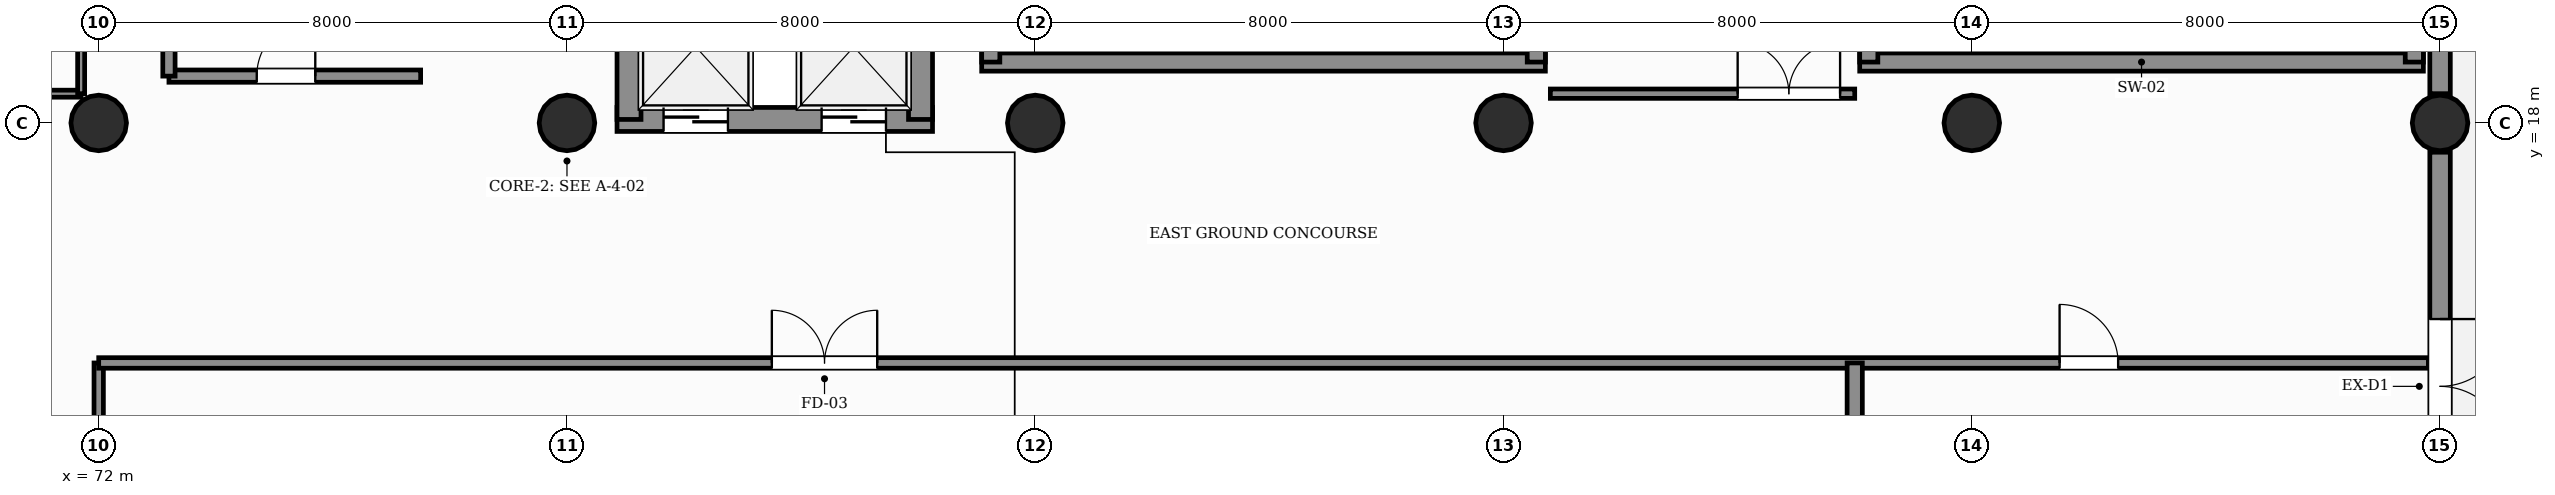
"""IFC4 building model, lengths in metres.
Left out: names, types, materials, properties, quantities, classifications, styles, units other than length and angle.
Written with IfcOpenShell. Run it as: python <this file> out.ifc"""

import sys

from ifc_helpers import new_model, si_unit, direction, frame, frame_2d, origin, origin_2d, place, context, subcontext, project, spatial, rectangle, circle, extrude, element, fill, save


model = new_model("IFC4")
c1 = context("Model", 3, precision=1e-05, world=origin(), true_north=direction((0.0, 1.0)))
c2 = subcontext(c1, "Body", "Model", "MODEL_VIEW")
j1 = project(units=[si_unit("LENGTHUNIT", "METRE"), si_unit("PLANEANGLEUNIT", "RADIAN")], contexts=[c1])
p1 = place(None, origin())
s1 = spatial("IfcSite", under=j1, at=p1, CompositionType="ELEMENT")
p2 = place(p1, origin())
s2 = spatial("IfcBuilding", under=s1, at=p2, CompositionType="ELEMENT")
p3 = place(p2, origin())
s3 = spatial("IfcBuildingStorey", under=s2, at=p3, CompositionType="ELEMENT", Elevation=0.0)
for number, where, z_axis, x_axis in (
    (1, (72.0, 18.0, 0.0), (0.0, 0.0, 1.0), (1.0, 0.0, 0.0)),
    (2, (80.0, 18.0, 0.0), (0.0, 0.0, 1.0), (1.0, 0.0, 0.0)),
    (3, (88.0, 18.0, 0.0), (0.0, 0.0, 1.0), (1.0, 0.0, 0.0)),
    (4, (96.0, 18.0, 0.0), (0.0, 0.0, 1.0), (1.0, 0.0, 0.0)),
    (5, (104.0, 18.0, 0.0), (0.0, 0.0, 1.0), (1.0, 0.0, 0.0)),
    (6, (112.0, 18.0, 0.0), (0.0, 0.0, 1.0), (1.0, 0.0, 0.0)),
):
    element("IfcColumn", number, at=place(p3, frame(where, z_axis=z_axis, x_axis=x_axis)), inside=s3, PredefinedType="COLUMN", context=c2, shape_type="SweptSolid", body=[
        extrude(circle(Radius=0.475, at=origin_2d()), origin(), (0.0, 0.0, 1.0), 6.0),
    ])
p4 = place(p3, frame((112.0, 9.5, 0.0), z_axis=(0.0, 0.0, 1.0), x_axis=(0.0, 1.0, 0.0)))
e7 = element("IfcWall", 7, at=p4, inside=s3, PredefinedType="SOLIDWALL", context=c2, shape_type="SweptSolid", body=[
    extrude(rectangle(XDim=8.0, YDim=0.35, at=frame_2d((4.0, 0.0))), origin(), (0.0, 0.0, 1.0), 4.7),
])
p5 = place(p4, frame((2.85, 0.0, 0.0)))
e8 = element("IfcOpeningElement", 8, at=p5, cuts=e7, PredefinedType="OPENING", context=c2, shape_type="SweptSolid", body=[
    extrude(rectangle(XDim=2.3, YDim=2.4, at=frame_2d((1.15, 1.2))), frame((0.0, 0.185, 0.0), z_axis=(0.0, -1.0, 0.0), x_axis=(1.0, 0.0, 0.0)), (0.0, 0.0, 1.0), 0.37),
])
p6 = place(p3, frame((112.0, 18.5, 0.0), z_axis=(0.0, 0.0, 1.0), x_axis=(0.0, 1.0, 0.0)))
e9 = element("IfcWall", 9, at=p6, inside=s3, PredefinedType="SOLIDWALL", context=c2, shape_type="SweptSolid", body=[
    extrude(rectangle(XDim=8.0, YDim=0.35, at=frame_2d((4.0, 0.0))), origin(), (0.0, 0.0, 1.0), 4.7),
])
p7 = place(p3, frame((73.2, 18.8, 0.0), z_axis=(0.0, 0.0, 1.0), x_axis=(1.0, 0.0, 0.0)))
e10 = element("IfcWall", 10, at=p7, inside=s3, PredefinedType="PARTITIONING", context=c2, shape_type="SweptSolid", body=[
    extrude(rectangle(XDim=4.3, YDim=0.21, at=frame_2d((2.15, 0.0))), origin(), (0.0, 0.0, 1.0), 4.65),
])
p8 = place(p7, frame((1.5, 0.0, 0.0)))
e11 = element("IfcOpeningElement", 11, at=p8, cuts=e10, PredefinedType="OPENING", context=c2, shape_type="SweptSolid", body=[
    extrude(rectangle(XDim=1.0, YDim=2.15, at=frame_2d((0.5, 1.075))), frame((0.0, 0.115, 0.0), z_axis=(0.0, -1.0, 0.0), x_axis=(1.0, 0.0, 0.0)), (0.0, 0.0, 1.0), 0.23),
])
p9 = place(p3, frame((73.2, 18.8, 0.0), z_axis=(0.0, 0.0, 1.0), x_axis=(0.0, 1.0, 0.0)))
e12 = element("IfcWall", 12, at=p9, inside=s3, PredefinedType="PARTITIONING", context=c2, shape_type="SweptSolid", body=[
    extrude(rectangle(XDim=4.6, YDim=0.21, at=frame_2d((2.3, 0.0))), origin(), (0.0, 0.0, 1.0), 4.65),
])
p10 = place(p3, frame((80.855, 18.06, 0.0), z_axis=(0.0, 0.0, 1.0), x_axis=(1.0, 0.0, 0.0)))
e13 = element("IfcWall", 13, at=p10, inside=s3, PredefinedType="SHEAR", context=c2, shape_type="SweptSolid", body=[
    extrude(rectangle(XDim=5.39, YDim=0.41, at=frame_2d((2.695, 0.0))), origin(), (0.0, 0.0, 1.0), 6.0),
])
p11 = place(p10, frame((0.795, 0.0, 0.0)))
e14 = element("IfcOpeningElement", 14, at=p11, cuts=e13, PredefinedType="OPENING", context=c2, shape_type="SweptSolid", body=[
    extrude(rectangle(XDim=1.1, YDim=2.2, at=frame_2d((0.55, 1.1))), frame((0.0, 0.215, 0.0), z_axis=(0.0, -1.0, 0.0), x_axis=(1.0, 0.0, 0.0)), (0.0, 0.0, 1.0), 0.43),
])
p12 = place(p10, frame((3.495, 0.0, 0.0)))
e15 = element("IfcOpeningElement", 15, at=p12, cuts=e13, PredefinedType="OPENING", context=c2, shape_type="SweptSolid", body=[
    extrude(rectangle(XDim=1.1, YDim=2.2, at=frame_2d((0.55, 1.1))), frame((0.0, 0.215, 0.0), z_axis=(0.0, -1.0, 0.0), x_axis=(1.0, 0.0, 0.0)), (0.0, 0.0, 1.0), 0.43),
])
for number, where, z_axis, x_axis in (
    (16, (81.06, 18.06, 0.0), (0.0, 0.0, 1.0), (0.0, 1.0, 0.0)),
    (17, (86.04, 18.06, 0.0), (0.0, 0.0, 1.0), (0.0, 1.0, 0.0)),
):
    element("IfcWall", number, at=place(p3, frame(where, z_axis=z_axis, x_axis=x_axis)), inside=s3, PredefinedType="SHEAR", context=c2, shape_type="SweptSolid", body=[
        extrude(rectangle(XDim=2.48, YDim=0.41, at=frame_2d((1.24, 0.0))), origin(), (0.0, 0.0, 1.0), 6.0),
    ])
p13 = place(p3, frame((102.085, 19.04, 0.0), z_axis=(0.0, 0.0, 1.0), x_axis=(1.0, 0.0, 0.0)))
e18 = element("IfcWall", 18, at=p13, inside=s3, PredefinedType="SHEAR", context=c2, shape_type="SweptSolid", body=[
    extrude(rectangle(XDim=9.63, YDim=0.31, at=frame_2d((4.815, 0.0))), origin(), (0.0, 0.0, 1.0), 6.0),
])
p14 = place(p3, frame((102.24, 19.04, 0.0), z_axis=(0.0, 0.0, 1.0), x_axis=(0.0, 1.0, 0.0)))
e19 = element("IfcWall", 19, at=p14, inside=s3, PredefinedType="SHEAR", context=c2, shape_type="SweptSolid", body=[
    extrude(rectangle(XDim=4.28, YDim=0.31, at=frame_2d((2.14, 0.0))), origin(), (0.0, 0.0, 1.0), 6.0),
])
p15 = place(p14, frame((0.55, 0.0, 0.0)))
e20 = element("IfcOpeningElement", 20, at=p15, cuts=e19, PredefinedType="OPENING", context=c2, shape_type="SweptSolid", body=[
    extrude(rectangle(XDim=1.15, YDim=2.2, at=frame_2d((0.575, 1.1))), frame((0.0, 0.165, 0.0), z_axis=(0.0, -1.0, 0.0), x_axis=(1.0, 0.0, 0.0)), (0.0, 0.0, 1.0), 0.33),
])
p16 = place(p3, frame((111.56, 19.04, 0.0), z_axis=(0.0, 0.0, 1.0), x_axis=(0.0, 1.0, 0.0)))
e21 = element("IfcWall", 21, at=p16, inside=s3, PredefinedType="SHEAR", context=c2, shape_type="SweptSolid", body=[
    extrude(rectangle(XDim=4.28, YDim=0.31, at=frame_2d((2.14, 0.0))), origin(), (0.0, 0.0, 1.0), 6.0),
])
p17 = place(p3, frame((87.085, 19.04, 0.0), z_axis=(0.0, 0.0, 1.0), x_axis=(1.0, 0.0, 0.0)))
e22 = element("IfcWall", 22, at=p17, inside=s3, PredefinedType="SHEAR", context=c2, shape_type="SweptSolid", body=[
    extrude(rectangle(XDim=9.63, YDim=0.31, at=frame_2d((4.815, 0.0))), origin(), (0.0, 0.0, 1.0), 6.0),
])
p18 = place(p3, frame((87.24, 19.04, 0.0), z_axis=(0.0, 0.0, 1.0), x_axis=(0.0, 1.0, 0.0)))
e23 = element("IfcWall", 23, at=p18, inside=s3, PredefinedType="SHEAR", context=c2, shape_type="SweptSolid", body=[
    extrude(rectangle(XDim=4.02, YDim=0.31, at=frame_2d((2.01, 0.0))), origin(), (0.0, 0.0, 1.0), 6.0),
])
p19 = place(p18, frame((0.55, 0.0, 0.0)))
e24 = element("IfcOpeningElement", 24, at=p19, cuts=e23, PredefinedType="OPENING", context=c2, shape_type="SweptSolid", body=[
    extrude(rectangle(XDim=1.25, YDim=2.2, at=frame_2d((0.625, 1.1))), frame((0.0, 0.165, 0.0), z_axis=(0.0, -1.0, 0.0), x_axis=(1.0, 0.0, 0.0)), (0.0, 0.0, 1.0), 0.33),
])
p20 = place(p3, frame((96.56, 19.04, 0.0), z_axis=(0.0, 0.0, 1.0), x_axis=(0.0, 1.0, 0.0)))
e25 = element("IfcWall", 25, at=p20, inside=s3, PredefinedType="SHEAR", context=c2, shape_type="SweptSolid", body=[
    extrude(rectangle(XDim=4.02, YDim=0.31, at=frame_2d((2.01, 0.0))), origin(), (0.0, 0.0, 1.0), 6.0),
])
p21 = place(p3, frame((58.3, 18.5, 0.0), z_axis=(0.0, 0.0, 1.0), x_axis=(1.0, 0.0, 0.0)))
e26 = element("IfcWall", 26, at=p21, inside=s3, PredefinedType="PARTITIONING", context=c2, shape_type="SweptSolid", body=[
    extrude(rectangle(XDim=13.4, YDim=0.12, at=frame_2d((6.7, 0.0))), origin(), (0.0, 0.0, 1.0), 4.65),
])
p22 = place(p21, frame((1.8, 0.0, 0.0)))
e27 = element("IfcOpeningElement", 27, at=p22, cuts=e26, PredefinedType="OPENING", context=c2, shape_type="SweptSolid", body=[
    extrude(rectangle(XDim=0.88, YDim=2.1, at=frame_2d((0.44, 1.05))), frame((0.0, 0.07, 0.0), z_axis=(0.0, -1.0, 0.0), x_axis=(1.0, 0.0, 0.0)), (0.0, 0.0, 1.0), 0.14),
])
p23 = place(p21, frame((7.0, 0.0, 0.0)))
e28 = element("IfcOpeningElement", 28, at=p23, cuts=e26, PredefinedType="OPENING", context=c2, shape_type="SweptSolid", body=[
    extrude(rectangle(XDim=0.88, YDim=2.1, at=frame_2d((0.44, 1.05))), frame((0.0, 0.07, 0.0), z_axis=(0.0, -1.0, 0.0), x_axis=(1.0, 0.0, 0.0)), (0.0, 0.0, 1.0), 0.14),
])
p24 = place(p21, frame((10.9, 0.0, 0.0)))
e29 = element("IfcOpeningElement", 29, at=p24, cuts=e26, PredefinedType="OPENING", context=c2, shape_type="SweptSolid", body=[
    extrude(rectangle(XDim=0.98, YDim=2.15, at=frame_2d((0.49, 1.075))), frame((0.0, 0.07, 0.0), z_axis=(0.0, -1.0, 0.0), x_axis=(1.0, 0.0, 0.0)), (0.0, 0.0, 1.0), 0.14),
])
p25 = place(p3, frame((71.7, 18.5, 0.0), z_axis=(0.0, 0.0, 1.0), x_axis=(0.0, 1.0, 0.0)))
e30 = element("IfcWall", 30, at=p25, inside=s3, PredefinedType="PARTITIONING", context=c2, shape_type="SweptSolid", body=[
    extrude(rectangle(XDim=7.8, YDim=0.12, at=frame_2d((3.9, 0.0))), origin(), (0.0, 0.0, 1.0), 4.65),
])
p26 = place(p3, frame((72.0, 3.3, 0.0), z_axis=(0.0, 0.0, 1.0), x_axis=(0.0, 1.0, 0.0)))
e31 = element("IfcWall", 31, at=p26, inside=s3, PredefinedType="PARTITIONING", context=c2, shape_type="SweptSolid", body=[
    extrude(rectangle(XDim=10.6, YDim=0.16, at=frame_2d((5.3, 0.0))), origin(), (0.0, 0.0, 1.0), 4.65),
])
p27 = place(p26, frame((2.7, 0.0, 0.0)))
e32 = element("IfcOpeningElement", 32, at=p27, cuts=e31, PredefinedType="OPENING", context=c2, shape_type="SweptSolid", body=[
    extrude(rectangle(XDim=1.6, YDim=2.3, at=frame_2d((0.8, 1.15))), frame((0.0, 0.09, 0.0), z_axis=(0.0, -1.0, 0.0), x_axis=(1.0, 0.0, 0.0)), (0.0, 0.0, 1.0), 0.18),
])
p28 = place(p3, frame((72.0, 13.9, 0.0), z_axis=(0.0, 0.0, 1.0), x_axis=(1.0, 0.0, 0.0)))
e33 = element("IfcWall", 33, at=p28, inside=s3, PredefinedType="PARTITIONING", context=c2, shape_type="SweptSolid", body=[
    extrude(rectangle(XDim=39.8, YDim=0.18, at=frame_2d((19.9, 0.0))), origin(), (0.0, 0.0, 1.0), 4.65),
])
p29 = place(p28, frame((11.5, 0.0, 0.0)))
e34 = element("IfcOpeningElement", 34, at=p29, cuts=e33, PredefinedType="OPENING", context=c2, shape_type="SweptSolid", body=[
    extrude(rectangle(XDim=1.8, YDim=2.25, at=frame_2d((0.9, 1.125))), frame((0.0, 0.1, 0.0), z_axis=(0.0, -1.0, 0.0), x_axis=(1.0, 0.0, 0.0)), (0.0, 0.0, 1.0), 0.2),
])
p30 = place(p28, frame((33.5, 0.0, 0.0)))
e35 = element("IfcOpeningElement", 35, at=p30, cuts=e33, PredefinedType="OPENING", context=c2, shape_type="SweptSolid", body=[
    extrude(rectangle(XDim=1.0, YDim=2.15, at=frame_2d((0.5, 1.075))), frame((0.0, 0.1, 0.0), z_axis=(0.0, -1.0, 0.0), x_axis=(1.0, 0.0, 0.0)), (0.0, 0.0, 1.0), 0.2),
])
p31 = place(p3, frame((102.0, 3.3, 0.0), z_axis=(0.0, 0.0, 1.0), x_axis=(0.0, 1.0, 0.0)))
e36 = element("IfcWall", 36, at=p31, inside=s3, PredefinedType="SOLIDWALL", context=c2, shape_type="SweptSolid", body=[
    extrude(rectangle(XDim=10.6, YDim=0.26, at=frame_2d((5.3, 0.0))), origin(), (0.0, 0.0, 1.0), 6.0),
])
p32 = place(p31, frame((1.8, 0.0, 0.0)))
e37 = element("IfcOpeningElement", 37, at=p32, cuts=e36, PredefinedType="OPENING", context=c2, shape_type="SweptSolid", body=[
    extrude(rectangle(XDim=1.0, YDim=2.15, at=frame_2d((0.5, 1.075))), frame((0.0, 0.14, 0.0), z_axis=(0.0, -1.0, 0.0), x_axis=(1.0, 0.0, 0.0)), (0.0, 0.0, 1.0), 0.28),
])
p33 = place(p3, frame((96.8, 18.5, 0.0), z_axis=(0.0, 0.0, 1.0), x_axis=(1.0, 0.0, 0.0)))
e38 = element("IfcWall", 38, at=p33, inside=s3, PredefinedType="PARTITIONING", context=c2, shape_type="SweptSolid", body=[
    extrude(rectangle(XDim=5.2, YDim=0.16, at=frame_2d((2.6, 0.0))), origin(), (0.0, 0.0, 1.0), 4.65),
])
p34 = place(p33, frame((3.2, 0.0, 0.0)))
e39 = element("IfcOpeningElement", 39, at=p34, cuts=e38, PredefinedType="OPENING", context=c2, shape_type="SweptSolid", body=[
    extrude(rectangle(XDim=1.75, YDim=2.35, at=frame_2d((0.875, 1.175))), frame((0.0, 0.09, 0.0), z_axis=(0.0, -1.0, 0.0), x_axis=(1.0, 0.0, 0.0)), (0.0, 0.0, 1.0), 0.18),
])
p35 = place(p5, frame((2.3, 0.0, 0.0), z_axis=(0.0, 0.0, 1.0), x_axis=(-1.0, 0.0, 0.0)))
e40 = element("IfcDoor", 40, at=p35, inside=s3, OperationType="DOUBLE_DOOR_SINGLE_SWING", PredefinedType="DOOR", context=c2, shape_type="SweptSolid", body=[
    extrude(rectangle(XDim=2.3, YDim=2.4, at=frame_2d((1.15, 1.2))), frame((0.0, 0.025, 0.0), z_axis=(0.0, -1.0, 0.0), x_axis=(1.0, 0.0, 0.0)), (0.0, 0.0, 1.0), 0.05),
])
fill(e8, e40)
p36 = place(p8, origin())
e41 = element("IfcDoor", 41, at=p36, inside=s3, OperationType="SINGLE_SWING_RIGHT", PredefinedType="DOOR", context=c2, shape_type="SweptSolid", body=[
    extrude(rectangle(XDim=1.0, YDim=2.15, at=frame_2d((0.5, 1.075))), frame((0.0, 0.025, 0.0), z_axis=(0.0, -1.0, 0.0), x_axis=(1.0, 0.0, 0.0)), (0.0, 0.0, 1.0), 0.05),
])
fill(e11, e41)
p37 = place(p11, origin())
e42 = element("IfcDoor", 42, at=p37, inside=s3, OperationType="DOUBLE_DOOR_SLIDING", PredefinedType="DOOR", context=c2, shape_type="SweptSolid", body=[
    extrude(rectangle(XDim=1.1, YDim=2.2, at=frame_2d((0.55, 1.1))), frame((0.0, 0.025, 0.0), z_axis=(0.0, -1.0, 0.0), x_axis=(1.0, 0.0, 0.0)), (0.0, 0.0, 1.0), 0.05),
])
fill(e14, e42)
p38 = place(p12, origin())
e43 = element("IfcDoor", 43, at=p38, inside=s3, OperationType="DOUBLE_DOOR_SLIDING", PredefinedType="DOOR", context=c2, shape_type="SweptSolid", body=[
    extrude(rectangle(XDim=1.1, YDim=2.2, at=frame_2d((0.55, 1.1))), frame((0.0, 0.025, 0.0), z_axis=(0.0, -1.0, 0.0), x_axis=(1.0, 0.0, 0.0)), (0.0, 0.0, 1.0), 0.05),
])
fill(e15, e43)
p39 = place(p29, origin())
e44 = element("IfcDoor", 44, at=p39, inside=s3, OperationType="DOUBLE_DOOR_SINGLE_SWING", PredefinedType="DOOR", context=c2, shape_type="SweptSolid", body=[
    extrude(rectangle(XDim=1.8, YDim=2.25, at=frame_2d((0.9, 1.125))), frame((0.0, 0.025, 0.0), z_axis=(0.0, -1.0, 0.0), x_axis=(1.0, 0.0, 0.0)), (0.0, 0.0, 1.0), 0.05),
])
fill(e34, e44)
p40 = place(p30, origin())
e45 = element("IfcDoor", 45, at=p40, inside=s3, OperationType="SINGLE_SWING_LEFT", PredefinedType="DOOR", context=c2, shape_type="SweptSolid", body=[
    extrude(rectangle(XDim=1.0, YDim=2.15, at=frame_2d((0.5, 1.075))), frame((0.0, 0.025, 0.0), z_axis=(0.0, -1.0, 0.0), x_axis=(1.0, 0.0, 0.0)), (0.0, 0.0, 1.0), 0.05),
])
fill(e35, e45)
p41 = place(p34, origin())
e46 = element("IfcDoor", 46, at=p41, inside=s3, OperationType="DOUBLE_DOOR_SINGLE_SWING", PredefinedType="DOOR", context=c2, shape_type="SweptSolid", body=[
    extrude(rectangle(XDim=1.75, YDim=2.35, at=frame_2d((0.875, 1.175))), frame((0.0, 0.025, 0.0), z_axis=(0.0, -1.0, 0.0), x_axis=(1.0, 0.0, 0.0)), (0.0, 0.0, 1.0), 0.05),
])
fill(e39, e46)
save(model, sys.argv[1])
